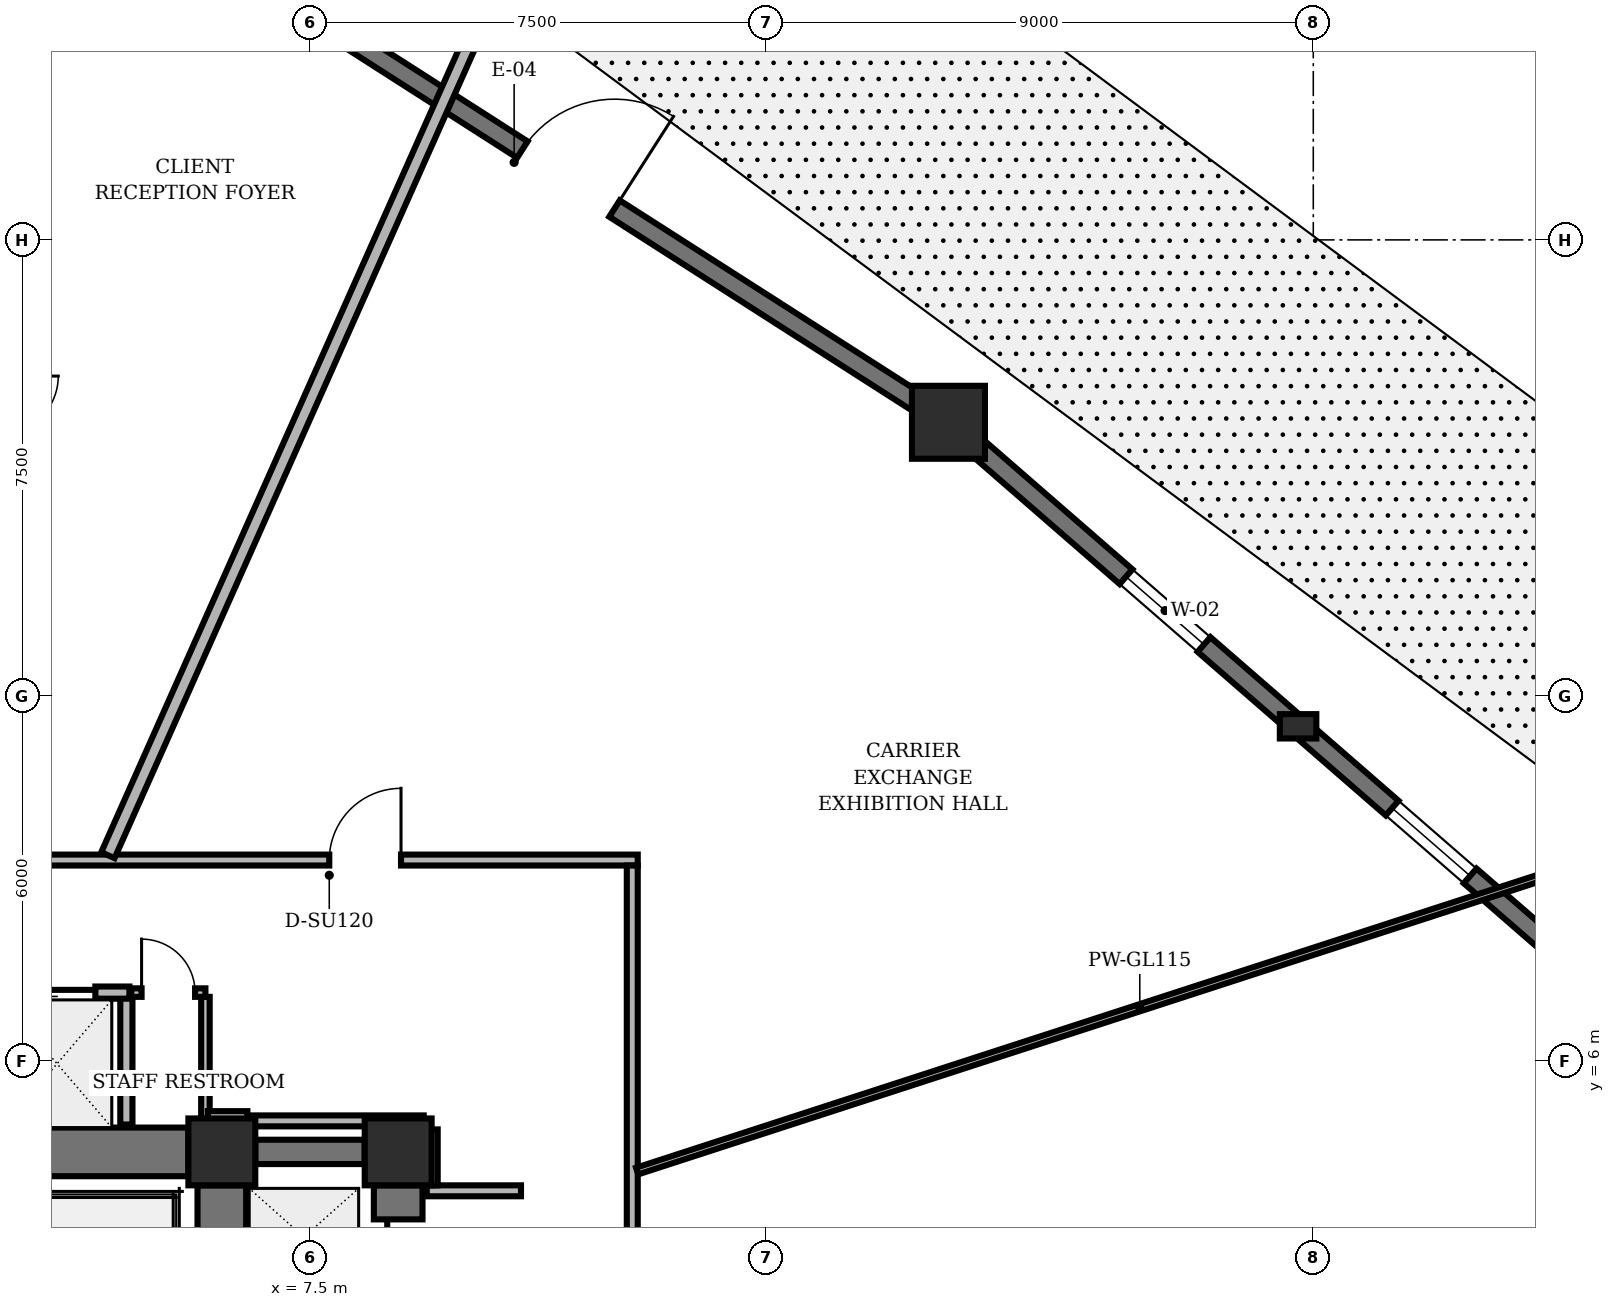
"""IFC4 building model, lengths in metres.
Left out: names, types, materials, properties, quantities, classifications, styles, units other than length and angle.
Written with IfcOpenShell. Run it as: python <this file> out.ifc"""

import sys

from ifc_helpers import new_model, si_unit, direction, frame, frame_2d, origin, origin_2d, place, context, subcontext, project, spatial, rectangle, hollow_rectangle, extrude, element, fill, save


model = new_model("IFC4")
c1 = context("Model", 3, precision=1e-05, world=origin(), true_north=direction((0.0, 1.0)))
c2 = subcontext(c1, "Body", "Model", "MODEL_VIEW")
j1 = project(units=[si_unit("LENGTHUNIT", "METRE"), si_unit("PLANEANGLEUNIT", "RADIAN")], contexts=[c1])
p1 = place(None, origin())
s1 = spatial("IfcSite", under=j1, at=p1, CompositionType="ELEMENT")
p2 = place(p1, origin())
s2 = spatial("IfcBuilding", under=s1, at=p2, CompositionType="ELEMENT")
p3 = place(p2, origin())
s3 = spatial("IfcBuildingStorey", under=s2, at=p3, CompositionType="ELEMENT", Elevation=0.0)
for number, where, z_axis, x_axis in (
    (1, (6.05, 4.5, 0.0), (0.0, 0.0, 1.0), (1.0, 0.0, 0.0)),
    (2, (8.95, 4.5, 0.0), (0.0, 0.0, 1.0), (1.0, 0.0, 0.0)),
):
    element("IfcColumn", number, at=place(p3, frame(where, z_axis=z_axis, x_axis=x_axis)), inside=s3, PredefinedType="COLUMN", context=c2, shape_type="SweptSolid", body=[
        extrude(hollow_rectangle(XDim=1.1, YDim=1.1, WallThickness=0.07, InnerFilletRadius=0.02, OuterFilletRadius=0.04, at=origin_2d()), origin(), (0.0, 0.0, 1.0), 4.8),
    ])
p4 = place(p3, frame((6.05, 0.55, 0.0), z_axis=(0.0, 0.0, 1.0), x_axis=(0.0, 1.0, 0.0)))
e3 = element("IfcWall", 3, at=p4, inside=s3, PredefinedType="SHEAR", context=c2, shape_type="SweptSolid", body=[
    extrude(rectangle(XDim=3.4, YDim=0.8, at=frame_2d((1.7, 0.0))), origin(), (0.0, 0.0, 1.0), 4.498),
])
p5 = place(p3, frame((2.05, 4.5, 0.0), z_axis=(0.0, 0.0, 1.0), x_axis=(1.0, 0.0, 0.0)))
e4 = element("IfcWall", 4, at=p5, inside=s3, PredefinedType="SHEAR", context=c2, shape_type="SweptSolid", body=[
    extrude(rectangle(XDim=3.45, YDim=0.8, at=frame_2d((1.725, 0.0))), origin(), (0.0, 0.0, 1.0), 4.498),
])
p6 = place(p3, frame((8.95, -3.75, 0.0), z_axis=(0.0, 0.0, 1.0), x_axis=(0.0, 1.0, 0.0)))
e5 = element("IfcWall", 5, at=p6, inside=s3, PredefinedType="SHEAR", context=c2, shape_type="SweptSolid", body=[
    extrude(rectangle(XDim=7.7, YDim=0.8, at=frame_2d((3.85, 0.0))), origin(), (0.0, 0.0, 1.0), 4.498),
])
p7 = place(p6, frame((0.55, 0.0, 0.0)))
e6 = element("IfcOpeningElement", 6, at=p7, cuts=e5, PredefinedType="OPENING", context=c2, shape_type="SweptSolid", body=[
    extrude(rectangle(XDim=1.06, YDim=2.04, at=frame_2d((0.53, 1.02))), frame((0.0, 0.41, 0.0), z_axis=(0.0, -1.0, 0.0), x_axis=(1.0, 0.0, 0.0)), (0.0, 0.0, 1.0), 0.82),
])
p8 = place(p6, frame((3.32, 0.0, 0.0)))
e7 = element("IfcOpeningElement", 7, at=p8, cuts=e5, PredefinedType="OPENING", context=c2, shape_type="SweptSolid", body=[
    extrude(rectangle(XDim=1.06, YDim=2.04, at=frame_2d((0.53, 1.02))), frame((0.0, 0.41, 0.0), z_axis=(0.0, -1.0, 0.0), x_axis=(1.0, 0.0, 0.0)), (0.0, 0.0, 1.0), 0.82),
])
p9 = place(p6, frame((6.08, 0.0, 0.0)))
e8 = element("IfcOpeningElement", 8, at=p9, cuts=e5, PredefinedType="OPENING", context=c2, shape_type="SweptSolid", body=[
    extrude(rectangle(XDim=1.06, YDim=2.04, at=frame_2d((0.53, 1.02))), frame((0.0, 0.41, 0.0), z_axis=(0.0, -1.0, 0.0), x_axis=(1.0, 0.0, 0.0)), (0.0, 0.0, 1.0), 0.82),
])
p10 = place(p3, frame((6.6, 4.5, 0.0), z_axis=(0.0, 0.0, 1.0), x_axis=(1.0, 0.0, 0.0)))
e9 = element("IfcWall", 9, at=p10, inside=s3, PredefinedType="SHEAR", context=c2, shape_type="SweptSolid", body=[
    extrude(rectangle(XDim=1.8, YDim=0.4, at=frame_2d((0.9, 0.0))), origin(), (0.0, 0.0, 1.0), 4.498),
])
p11 = place(p3, frame((18.0, 16.5, 0.0), z_axis=(0.0, 0.0, 1.0), x_axis=(1.0, 0.0, 0.0)))
e10 = element("IfcColumn", 10, at=p11, inside=s3, PredefinedType="COLUMN", context=c2, shape_type="SweptSolid", body=[
    extrude(rectangle(XDim=1.2, YDim=1.2, at=origin_2d()), origin(), (0.0, 0.0, 1.0), 4.8),
])
p12 = place(p3, frame((23.75, 11.5, 0.0), z_axis=(0.0, 0.0, 1.0), x_axis=(1.0, 0.0, 0.0)))
e11 = element("IfcColumn", 11, at=p12, inside=s3, PredefinedType="PILASTER", context=c2, shape_type="SweptSolid", body=[
    extrude(rectangle(XDim=0.6, YDim=0.4, at=origin_2d()), origin(), (0.0, 0.0, 1.0), 4.8),
])
p13 = place(p3, frame((18.468, 16.093, 0.0), z_axis=(0.0, 0.0, 1.0), x_axis=(0.754589002666, -0.656197711863, 0.0)))
e12 = element("IfcWall", 12, at=p13, inside=s3, PredefinedType="SOLIDWALL", context=c2, shape_type="SweptSolid", body=[
    extrude(rectangle(XDim=14.0, YDim=0.32, at=frame_2d((7.0, 0.0))), origin(), (0.0, 0.0, 1.0), 3.868),
])
p14 = place(p13, frame((3.25, 0.0, 0.65)))
e13 = element("IfcOpeningElement", 13, at=p14, cuts=e12, PredefinedType="OPENING", context=c2, shape_type="SweptSolid", body=[
    extrude(rectangle(XDim=1.7, YDim=1.5, at=frame_2d((0.85, 0.75))), frame((0.0, 0.17, 0.0), z_axis=(0.0, -1.0, 0.0), x_axis=(1.0, 0.0, 0.0)), (0.0, 0.0, 1.0), 0.34),
])
p15 = place(p13, frame((9.05, 0.0, 0.65)))
e14 = element("IfcOpeningElement", 14, at=p15, cuts=e12, PredefinedType="OPENING", context=c2, shape_type="SweptSolid", body=[
    extrude(rectangle(XDim=1.7, YDim=1.5, at=frame_2d((0.85, 0.75))), frame((0.0, 0.17, 0.0), z_axis=(0.0, -1.0, 0.0), x_axis=(1.0, 0.0, 0.0)), (0.0, 0.0, 1.0), 0.34),
])
p16 = place(p3, frame((6.022, 24.166, 0.0), z_axis=(0.0, 0.0, 1.0), x_axis=(0.842272052664, -0.539052677667, 0.0)))
e15 = element("IfcWall", 15, at=p16, inside=s3, PredefinedType="SOLIDWALL", context=c2, shape_type="SweptSolid", body=[
    extrude(rectangle(XDim=13.601, YDim=0.32, at=frame_2d((6.8, 0.0))), origin(), (0.0, 0.0, 1.0), 3.868),
])
p17 = place(p16, frame((5.9, 0.0, 0.0)))
e16 = element("IfcOpeningElement", 16, at=p17, cuts=e15, PredefinedType="OPENING", context=c2, shape_type="SweptSolid", body=[
    extrude(rectangle(XDim=1.8, YDim=2.3, at=frame_2d((0.9, 1.15))), frame((0.0, 0.17, 0.0), z_axis=(0.0, -1.0, 0.0), x_axis=(1.0, 0.0, 0.0)), (0.0, 0.0, 1.0), 0.34),
])
p18 = place(p3, frame((4.48, 4.95, 0.0), z_axis=(0.0, 0.0, 1.0), x_axis=(0.0, 1.0, 0.0)))
e17 = element("IfcWall", 17, at=p18, inside=s3, PredefinedType="PARTITIONING", context=c2, shape_type="SweptSolid", body=[
    extrude(rectangle(XDim=2.1, YDim=0.2, at=frame_2d((1.05, 0.0))), origin(), (0.0, 0.0, 1.0), 4.473),
])
p19 = place(p3, frame((2.15, 7.12, 0.0), z_axis=(0.0, 0.0, 1.0), x_axis=(1.0, 0.0, 0.0)))
e18 = element("IfcWall", 18, at=p19, inside=s3, PredefinedType="PARTITIONING", context=c2, shape_type="SweptSolid", body=[
    extrude(rectangle(XDim=2.38, YDim=0.2, at=frame_2d((1.19, 0.0))), origin(), (0.0, 0.0, 1.0), 4.473),
])
p20 = place(p19, frame((0.56, 0.0, 0.0)))
e19 = element("IfcOpeningElement", 19, at=p20, cuts=e18, PredefinedType="OPENING", context=c2, shape_type="SweptSolid", body=[
    extrude(rectangle(XDim=1.26, YDim=2.06, at=frame_2d((0.63, 1.03))), frame((0.0, 0.11, 0.0), z_axis=(0.0, -1.0, 0.0), x_axis=(1.0, 0.0, 0.0)), (0.0, 0.0, 1.0), 0.22),
])
p21 = place(p3, frame((5.78, 4.95, 0.0), z_axis=(0.0, 0.0, 1.0), x_axis=(0.0, 1.0, 0.0)))
e20 = element("IfcWall", 20, at=p21, inside=s3, PredefinedType="PARTITIONING", context=c2, shape_type="SweptSolid", body=[
    extrude(rectangle(XDim=2.1, YDim=0.14, at=frame_2d((1.05, 0.0))), origin(), (0.0, 0.0, 1.0), 3.598),
])
p22 = place(p3, frame((4.56, 7.12, 0.0), z_axis=(0.0, 0.0, 1.0), x_axis=(1.0, 0.0, 0.0)))
e21 = element("IfcWall", 21, at=p22, inside=s3, PredefinedType="PARTITIONING", context=c2, shape_type="SweptSolid", body=[
    extrude(rectangle(XDim=1.22, YDim=0.14, at=frame_2d((0.61, 0.0))), origin(), (0.0, 0.0, 1.0), 4.473),
])
p23 = place(p22, frame((0.17, 0.0, 0.0)))
e22 = element("IfcOpeningElement", 22, at=p23, cuts=e21, PredefinedType="OPENING", context=c2, shape_type="SweptSolid", body=[
    extrude(rectangle(XDim=0.88, YDim=2.02, at=frame_2d((0.44, 1.01))), frame((0.0, 0.08, 0.0), z_axis=(0.0, -1.0, 0.0), x_axis=(1.0, 0.0, 0.0)), (0.0, 0.0, 1.0), 0.16),
])
p24 = place(p3, frame((2.31, 9.3, 0.0), z_axis=(0.0, 0.0, 1.0), x_axis=(1.0, 0.0, 0.0)))
e23 = element("IfcWall", 23, at=p24, inside=s3, PredefinedType="PARTITIONING", context=c2, shape_type="SweptSolid", body=[
    extrude(rectangle(XDim=10.58, YDim=0.18, at=frame_2d((5.29, 0.0))), origin(), (0.0, 0.0, 1.0), 3.987),
])
p25 = place(p24, frame((5.507, 0.0, 0.0)))
e24 = element("IfcOpeningElement", 24, at=p25, cuts=e23, PredefinedType="OPENING", context=c2, shape_type="SweptSolid", body=[
    extrude(rectangle(XDim=1.18, YDim=2.02, at=frame_2d((0.59, 1.01))), frame((0.0, 0.1, 0.0), z_axis=(0.0, -1.0, 0.0), x_axis=(1.0, 0.0, 0.0)), (0.0, 0.0, 1.0), 0.2),
])
p26 = place(p3, frame((12.8, 9.21, 0.0), z_axis=(0.0, 0.0, 1.0), x_axis=(0.0, -1.0, 0.0)))
e25 = element("IfcWall", 25, at=p26, inside=s3, PredefinedType="PARTITIONING", context=c2, shape_type="SweptSolid", body=[
    extrude(rectangle(XDim=7.62, YDim=0.18, at=frame_2d((3.81, 0.0))), origin(), (0.0, 0.0, 1.0), 4.473),
])
p27 = place(p3, frame((10.97, 3.86, 0.0), z_axis=(0.0, 0.0, 1.0), x_axis=(-1.0, 0.0, 0.0)))
e26 = element("IfcWall", 26, at=p27, inside=s3, PredefinedType="PARTITIONING", context=c2, shape_type="SweptSolid", body=[
    extrude(rectangle(XDim=1.55, YDim=0.18, at=frame_2d((0.775, 0.0))), origin(), (0.0, 0.0, 1.0), 4.473),
])
p28 = place(p3, frame((9.51, 3.95, 0.0), z_axis=(0.0, 0.0, 1.0), x_axis=(0.0, 1.0, 0.0)))
e27 = element("IfcWall", 27, at=p28, inside=s3, PredefinedType="PARTITIONING", context=c2, shape_type="SweptSolid", body=[
    extrude(rectangle(XDim=0.92, YDim=0.18, at=frame_2d((0.46, 0.0))), origin(), (0.0, 0.0, 1.0), 4.473),
])
p29 = place(p3, frame((9.37, 5.01, 0.0), z_axis=(0.0, 0.0, 1.0), x_axis=(-1.0, 0.0, 0.0)))
e28 = element("IfcWall", 28, at=p29, inside=s3, PredefinedType="PARTITIONING", context=c2, shape_type="SweptSolid", body=[
    extrude(rectangle(XDim=2.808, YDim=0.18, at=frame_2d((1.404, 0.0))), origin(), (0.0, 0.0, 1.0), 4.473),
])
p30 = place(p3, frame((6.47, 5.08, 0.0), z_axis=(0.0, 0.0, 1.0), x_axis=(-1.0, 0.0, 0.0)))
e29 = element("IfcWall", 29, at=p30, inside=s3, PredefinedType="PARTITIONING", context=c2, shape_type="SweptSolid", body=[
    extrude(rectangle(XDim=0.65, YDim=0.18, at=frame_2d((0.325, 0.0))), origin(), (0.0, 0.0, 1.0), 4.473),
])
p31 = place(p3, frame((12.88, 4.185, 0.0), z_axis=(0.0, 0.0, 1.0), x_axis=(0.951056153028, 0.309018112394, 0.0)))
e30 = element("IfcWall", 30, at=p31, inside=s3, PredefinedType="MOVABLE", context=c2, shape_type="SweptSolid", body=[
    extrude(rectangle(XDim=17.384, YDim=0.115, at=frame_2d((8.692, 0.0))), origin(), (0.0, 0.0, 1.0), 3.598),
])
p32 = place(p3, frame((4.176, 9.38, 0.0), z_axis=(0.0, 0.0, 1.0), x_axis=(0.406726574704, 0.913549940304, 0.0)))
e31 = element("IfcWall", 31, at=p32, inside=s3, PredefinedType="PARTITIONING", context=c2, shape_type="SweptSolid", body=[
    extrude(rectangle(XDim=15.559, YDim=0.24, at=frame_2d((7.779, 0.0))), origin(), (0.0, 0.0, 1.0), 4.473),
])
p33 = place(p14, origin())
e32 = element("IfcWindow", 32, at=p33, inside=s3, PartitioningType="SINGLE_PANEL", PredefinedType="WINDOW", context=c2, shape_type="SweptSolid", body=[
    extrude(rectangle(XDim=1.7, YDim=1.5, at=frame_2d((0.85, 0.75))), frame((0.0, 0.03, 0.0), z_axis=(0.0, -1.0, 0.0), x_axis=(1.0, 0.0, 0.0)), (0.0, 0.0, 1.0), 0.06),
])
fill(e13, e32)
p34 = place(p15, origin())
e33 = element("IfcWindow", 33, at=p34, inside=s3, PartitioningType="SINGLE_PANEL", PredefinedType="WINDOW", context=c2, shape_type="SweptSolid", body=[
    extrude(rectangle(XDim=1.7, YDim=1.5, at=frame_2d((0.85, 0.75))), frame((0.0, 0.03, 0.0), z_axis=(0.0, -1.0, 0.0), x_axis=(1.0, 0.0, 0.0)), (0.0, 0.0, 1.0), 0.06),
])
fill(e14, e33)
p35 = place(p17, origin())
e34 = element("IfcDoor", 34, at=p35, inside=s3, OperationType="SINGLE_SWING_RIGHT", PredefinedType="DOOR", context=c2, shape_type="SweptSolid", body=[
    extrude(rectangle(XDim=1.8, YDim=2.3, at=frame_2d((0.9, 1.15))), frame((0.0, 0.025, 0.0), z_axis=(0.0, -1.0, 0.0), x_axis=(1.0, 0.0, 0.0)), (0.0, 0.0, 1.0), 0.05),
])
fill(e16, e34)
p36 = place(p20, origin())
e35 = element("IfcDoor", 35, at=p36, inside=s3, OperationType="SLIDING_TO_LEFT", PredefinedType="DOOR", context=c2, shape_type="SweptSolid", body=[
    extrude(rectangle(XDim=1.26, YDim=2.06, at=frame_2d((0.63, 1.03))), frame((0.0, 0.025, 0.0), z_axis=(0.0, -1.0, 0.0), x_axis=(1.0, 0.0, 0.0)), (0.0, 0.0, 1.0), 0.05),
])
fill(e19, e35)
p37 = place(p23, origin())
e36 = element("IfcDoor", 36, at=p37, inside=s3, OperationType="SINGLE_SWING_LEFT", PredefinedType="DOOR", context=c2, shape_type="SweptSolid", body=[
    extrude(rectangle(XDim=0.88, YDim=2.02, at=frame_2d((0.44, 1.01))), frame((0.0, 0.025, 0.0), z_axis=(0.0, -1.0, 0.0), x_axis=(1.0, 0.0, 0.0)), (0.0, 0.0, 1.0), 0.05),
])
fill(e22, e36)
p38 = place(p9, origin())
e37 = element("IfcDoor", 37, at=p38, inside=s3, OperationType="SLIDING_TO_LEFT", PredefinedType="DOOR", context=c2, shape_type="SweptSolid", body=[
    extrude(rectangle(XDim=1.06, YDim=2.04, at=frame_2d((0.53, 1.02))), frame((0.0, 0.025, 0.0), z_axis=(0.0, -1.0, 0.0), x_axis=(1.0, 0.0, 0.0)), (0.0, 0.0, 1.0), 0.05),
])
fill(e8, e37)
p39 = place(p25, origin())
e38 = element("IfcDoor", 38, at=p39, inside=s3, OperationType="SINGLE_SWING_RIGHT", PredefinedType="DOOR", context=c2, shape_type="SweptSolid", body=[
    extrude(rectangle(XDim=1.18, YDim=2.02, at=frame_2d((0.59, 1.01))), frame((0.0, 0.025, 0.0), z_axis=(0.0, -1.0, 0.0), x_axis=(1.0, 0.0, 0.0)), (0.0, 0.0, 1.0), 0.05),
])
fill(e24, e38)
save(model, sys.argv[1])
